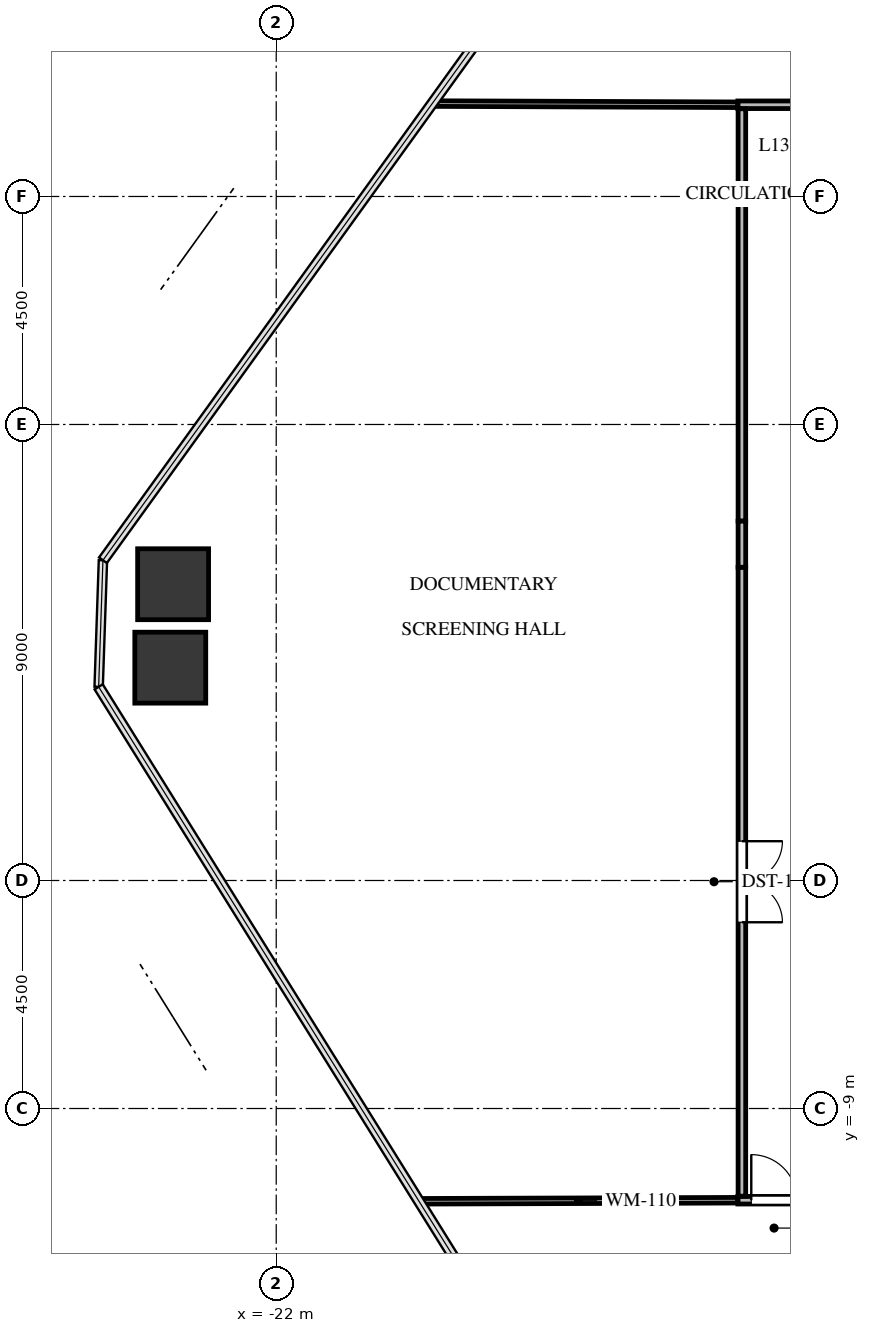
"""IFC4 building model, lengths in metres.
Left out: names, types, materials, properties, quantities, classifications, styles, units other than length and angle.
Written with IfcOpenShell. Run it as: python <this file> out.ifc"""

import sys

from ifc_helpers import new_model, si_unit, direction, frame, frame_2d, origin, origin_2d, place, context, subcontext, project, spatial, rectangle, extrude, source, transform, mapped, element, fill, save


model = new_model("IFC4")
c1 = context("Model", 3, precision=1e-05, world=origin(), true_north=direction((0.0, 1.0)))
c2 = subcontext(c1, "Body", "Model", "MODEL_VIEW")
j1 = project(units=[si_unit("LENGTHUNIT", "METRE"), si_unit("PLANEANGLEUNIT", "RADIAN")], contexts=[c1])
p1 = place(None, origin())
s1 = spatial("IfcSite", under=j1, at=p1, CompositionType="ELEMENT")
p2 = place(p1, origin())
s2 = spatial("IfcBuilding", under=s1, at=p2, CompositionType="ELEMENT")
p3 = place(p2, frame((0.0, 0.0, 55.5)))
s3 = spatial("IfcBuildingStorey", under=s2, at=p3, CompositionType="ELEMENT", Elevation=55.5)
m1 = source(origin(), c2, "Body", "SweptSolid", [
    extrude(rectangle(XDim=1.4, YDim=1.4, at=origin_2d()), origin(), (0.0, 0.0, 1.0), 3.3),
])
for number, where, z_axis, x_axis in (
    (1, (-24.091, -0.3, -0.24), (0.0, 0.0, 1.0), (1.0, 0.0, 0.0)),
    (2, (-24.035, 1.347, -0.24), (0.0, 0.0, 1.0), (1.0, 0.0, 0.0)),
):
    element("IfcColumn", number, at=place(p3, frame(where, z_axis=z_axis, x_axis=x_axis)), inside=s3, PredefinedType="COLUMN", context=c2, shape_type="MappedRepresentation", body=[
        mapped(m1, transform((0.0, 0.0, 0.0), x_axis=(1.0, 0.0, 0.0), y_axis=(0.0, 1.0, 0.0), z_axis=(0.0, 0.0, 1.0), scale=1.0)),
    ])
p4 = place(p3, frame((-10.72, 10.81, 0.0), z_axis=(0.0, 0.0, 1.0), x_axis=(-1.0, 0.0, 0.0)))
e3 = element("IfcWall", 3, at=p4, inside=s3, PredefinedType="PARTITIONING", context=c2, shape_type="SweptSolid", body=[
    extrude(rectangle(XDim=2.17, YDim=0.15, at=frame_2d((1.085, 0.0))), origin(), (0.0, 0.0, 1.0), 3.045),
])
p5 = place(p3, frame((-12.89, -10.81, 0.0), z_axis=(0.0, 0.0, 1.0), x_axis=(1.0, 0.0, 0.0)))
e4 = element("IfcWall", 4, at=p5, inside=s3, PredefinedType="PARTITIONING", context=c2, shape_type="SweptSolid", body=[
    extrude(rectangle(XDim=1.43, YDim=0.15, at=frame_2d((0.715, 0.0))), origin(), (0.0, 0.0, 1.0), 3.045),
])
p6 = place(p5, frame((0.265, 0.0, 0.0)))
e5 = element("IfcOpeningElement", 5, at=p6, cuts=e4, PredefinedType="OPENING", context=c2, shape_type="SweptSolid", body=[
    extrude(rectangle(XDim=0.9, YDim=2.05, at=frame_2d((0.45, 1.025))), frame((0.0, 0.085, 0.0), z_axis=(0.0, -1.0, 0.0), x_axis=(1.0, 0.0, 0.0)), (0.0, 0.0, 1.0), 0.17),
])
p7 = place(p3, frame((-12.81, 10.731, 0.0), z_axis=(0.0, 0.0, 1.0), x_axis=(0.0, -1.0, 0.0)))
e6 = element("IfcWall", 6, at=p7, inside=s3, PredefinedType="PARTITIONING", context=c2, shape_type="SweptSolid", body=[
    extrude(rectangle(XDim=8.139, YDim=0.15, at=frame_2d((4.069, 0.0))), origin(), (0.0, 0.0, 1.0), 3.045),
])
p8 = place(p3, frame((-12.81, 1.682, 0.0), z_axis=(0.0, 0.0, 1.0), x_axis=(0.0, -1.0, 0.0)))
e7 = element("IfcWall", 7, at=p8, inside=s3, PredefinedType="PARTITIONING", context=c2, shape_type="SweptSolid", body=[
    extrude(rectangle(XDim=12.413, YDim=0.15, at=frame_2d((6.207, 0.0))), origin(), (0.0, 0.0, 1.0), 3.045),
])
p9 = place(p8, frame((5.406, 0.0, 0.0)))
e8 = element("IfcOpeningElement", 8, at=p9, cuts=e7, PredefinedType="OPENING", context=c2, shape_type="SweptSolid", body=[
    extrude(rectangle(XDim=1.6, YDim=2.15, at=frame_2d((0.8, 1.075))), frame((0.0, 0.085, 0.0), z_axis=(0.0, -1.0, 0.0), x_axis=(1.0, 0.0, 0.0)), (0.0, 0.0, 1.0), 0.17),
])
p10 = place(p3, frame((-12.81, 2.592, 0.0), z_axis=(0.0, 0.0, 1.0), x_axis=(0.0, -1.0, 0.0)))
e9 = element("IfcWall", 9, at=p10, inside=s3, PredefinedType="PARTITIONING", context=c2, shape_type="SweptSolid", body=[
    extrude(rectangle(XDim=0.91, YDim=0.15, at=frame_2d((0.455, 0.0))), origin(), (0.0, 0.0, 1.0), 2.13),
])
p11 = place(p3, frame((-12.89, 10.81, 0.0), z_axis=(0.0, 0.0, 1.0), x_axis=(-0.999992607823, 0.003845035728, 0.0)))
e10 = element("IfcWall", 10, at=p11, inside=s3, PredefinedType="MOVABLE", context=c2, shape_type="SweptSolid", body=[
    extrude(rectangle(XDim=6.032, YDim=0.11, at=frame_2d((3.016, 0.0))), origin(), (0.0, 0.0, 1.0), 2.38),
])
p12 = place(p3, frame((-19.182, -10.831, 0.0), z_axis=(0.0, 0.0, 1.0), x_axis=(0.999994432845, 0.003336806783, 0.0)))
e11 = element("IfcWall", 11, at=p12, inside=s3, PredefinedType="MOVABLE", context=c2, shape_type="SweptSolid", body=[
    extrude(rectangle(XDim=6.292, YDim=0.11, at=frame_2d((3.146, 0.0))), origin(), (0.0, 0.0, 1.0), 2.38),
])
m2 = source(origin(), c2, "Body", "SweptSolid", [
    extrude(rectangle(XDim=0.9, YDim=2.05, at=frame_2d((0.45, 1.025))), frame((0.0, 0.025, 0.0), z_axis=(0.0, -1.0, 0.0), x_axis=(1.0, 0.0, 0.0)), (0.0, 0.0, 1.0), 0.05),
])
p13 = place(p6, origin())
e12 = element("IfcDoor", 12, at=p13, inside=s3, OperationType="SINGLE_SWING_LEFT", PredefinedType="DOOR", context=c2, shape_type="MappedRepresentation", body=[
    mapped(m2, transform((0.0, 0.0, 0.0), x_axis=(1.0, 0.0, 0.0), y_axis=(0.0, 1.0, 0.0), z_axis=(0.0, 0.0, 1.0), scale=1.0)),
])
fill(e5, e12)
m3 = source(origin(), c2, "Body", "SweptSolid", [
    extrude(rectangle(XDim=1.6, YDim=2.15, at=frame_2d((0.8, 1.075))), frame((0.0, 0.025, 0.0), z_axis=(0.0, -1.0, 0.0), x_axis=(1.0, 0.0, 0.0)), (0.0, 0.0, 1.0), 0.05),
])
p14 = place(p9, origin())
e13 = element("IfcDoor", 13, at=p14, inside=s3, OperationType="DOUBLE_DOOR_SINGLE_SWING", PredefinedType="DOOR", context=c2, shape_type="MappedRepresentation", body=[
    mapped(m3, transform((0.0, 0.0, 0.0), x_axis=(1.0, 0.0, 0.0), y_axis=(0.0, 1.0, 0.0), z_axis=(0.0, 0.0, 1.0), scale=1.0)),
])
fill(e8, e13)
save(model, sys.argv[1])
